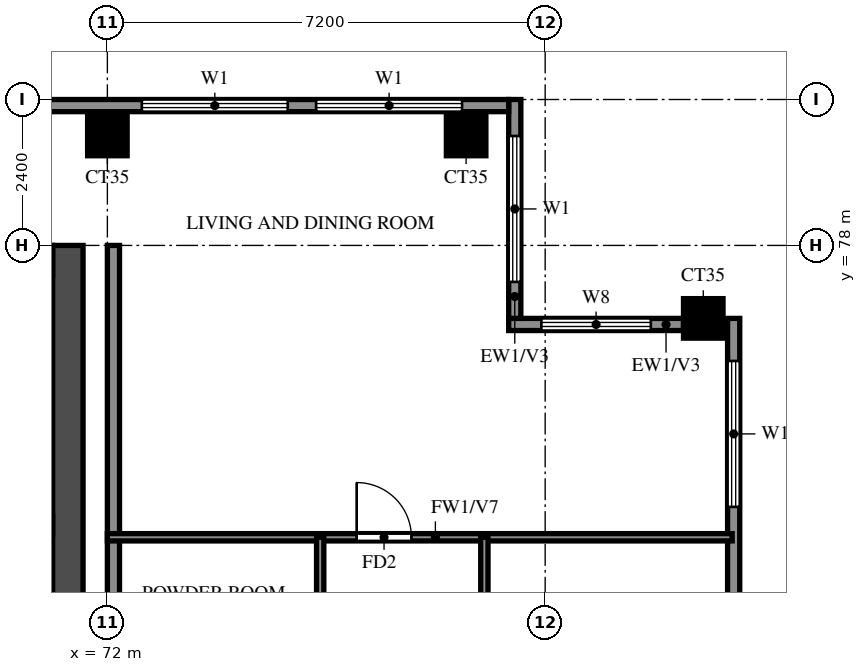
"""IFC4 building model, lengths in metres.
Left out: names, types, materials, properties, quantities, classifications, styles, units other than length and angle.
Written with IfcOpenShell. Run it as: python <this file> out.ifc"""

import sys

from ifc_helpers import new_model, si_unit, direction, frame, frame_2d, origin, origin_2d, place, context, subcontext, project, spatial, rectangle, extrude, source, transform, mapped, element, fill, save


model = new_model("IFC4")
c1 = context("Model", 3, precision=1e-05, world=origin(), true_north=direction((0.0, 1.0)))
c2 = subcontext(c1, "Body", "Model", "MODEL_VIEW")
j1 = project(units=[si_unit("LENGTHUNIT", "METRE"), si_unit("PLANEANGLEUNIT", "RADIAN")], contexts=[c1])
p1 = place(None, origin())
s1 = spatial("IfcSite", under=j1, at=p1, CompositionType="ELEMENT")
p2 = place(p1, origin())
s2 = spatial("IfcBuilding", under=s1, at=p2, CompositionType="ELEMENT")
p3 = place(p2, frame((0.0, 0.0, 243.0)))
s3 = spatial("IfcBuildingStorey", under=s2, at=p3, CompositionType="ELEMENT", Elevation=243.0)
m1 = source(origin(), c2, "Body", "SweptSolid", [
    extrude(rectangle(XDim=0.65, YDim=0.65, at=origin_2d()), origin(), (0.0, 0.0, 1.0), 3.22),
])
for number, where, z_axis, x_axis in (
    (1, (81.8, 76.8, 0.0), (0.0, 0.0, 1.0), (1.0, 0.0, 0.0)),
    (2, (72.0, 79.8, 0.0), (0.0, 0.0, 1.0), (1.0, 0.0, 0.0)),
    (3, (77.9, 79.8, 0.0), (0.0, 0.0, 1.0), (1.0, 0.0, 0.0)),
):
    element("IfcColumn", number, at=place(p3, frame(where, z_axis=z_axis, x_axis=x_axis)), inside=s3, PredefinedType="COLUMN", context=c2, shape_type="MappedRepresentation", body=[
        mapped(m1, transform((0.0, 0.0, 0.0))),
    ])
p4 = place(p3, frame((71.35, 66.15, 0.0), z_axis=(0.0, 0.0, 1.0), x_axis=(0.0, 1.0, 0.0)))
e4 = element("IfcWall", 4, at=p4, inside=s3, PredefinedType="SHEAR", context=c2, shape_type="SweptSolid", body=[
    extrude(rectangle(XDim=11.85, YDim=0.5, at=frame_2d((5.925, 0.0))), origin(), (0.0, 0.0, 1.0), 3.22),
])
p5 = place(p3, frame((29.7, 77.75, 0.0), z_axis=(0.0, 0.0, 1.0), x_axis=(1.0, 0.0, 0.0)))
e5 = element("IfcWall", 5, at=p5, inside=s3, PredefinedType="SHEAR", context=c2, shape_type="SweptSolid", body=[
    extrude(rectangle(XDim=41.4, YDim=0.5, at=frame_2d((20.7, 0.0))), origin(), (0.0, 0.0, 1.0), 3.22),
])
p6 = place(p3, frame((82.3, 48.2, 0.0), z_axis=(0.0, 0.0, 1.0), x_axis=(0.0, 1.0, 0.0)))
e6 = element("IfcWall", 6, at=p6, inside=s3, PredefinedType="SOLIDWALL", context=c2, shape_type="SweptSolid", body=[
    extrude(rectangle(XDim=28.6, YDim=0.2, at=frame_2d((14.3, 0.0))), origin(), (0.0, 0.0, 1.0), 3.22),
])
p7 = place(p6, frame((11.5, 0.0, 0.0)))
e7 = element("IfcOpeningElement", 7, at=p7, cuts=e6, PredefinedType="OPENING", context=c2, shape_type="SweptSolid", body=[
    extrude(rectangle(XDim=1.8, YDim=2.4, at=frame_2d((0.9, 1.2))), frame((0.0, 0.11, 0.0), z_axis=(0.0, -1.0, 0.0), x_axis=(1.0, 0.0, 0.0)), (0.0, 0.0, 1.0), 0.22),
])
p8 = place(p6, frame((0.9, 0.0, 0.6)))
e8 = element("IfcOpeningElement", 8, at=p8, cuts=e6, PredefinedType="OPENING", context=c2, shape_type="SweptSolid", body=[
    extrude(rectangle(XDim=2.4, YDim=2.4, at=frame_2d((1.2, 1.2))), frame((0.0, 0.11, 0.0), z_axis=(0.0, -1.0, 0.0), x_axis=(1.0, 0.0, 0.0)), (0.0, 0.0, 1.0), 0.22),
])
p9 = place(p6, frame((3.9, 0.0, 0.6)))
e9 = element("IfcOpeningElement", 9, at=p9, cuts=e6, PredefinedType="OPENING", context=c2, shape_type="SweptSolid", body=[
    extrude(rectangle(XDim=2.4, YDim=2.4, at=frame_2d((1.2, 1.2))), frame((0.0, 0.11, 0.0), z_axis=(0.0, -1.0, 0.0), x_axis=(1.0, 0.0, 0.0)), (0.0, 0.0, 1.0), 0.22),
])
p10 = place(p6, frame((7.3, 0.0, 0.6)))
e10 = element("IfcOpeningElement", 10, at=p10, cuts=e6, PredefinedType="OPENING", context=c2, shape_type="SweptSolid", body=[
    extrude(rectangle(XDim=1.8, YDim=2.4, at=frame_2d((0.9, 1.2))), frame((0.0, 0.11, 0.0), z_axis=(0.0, -1.0, 0.0), x_axis=(1.0, 0.0, 0.0)), (0.0, 0.0, 1.0), 0.22),
])
p11 = place(p6, frame((14.5, 0.0, 0.6)))
e11 = element("IfcOpeningElement", 11, at=p11, cuts=e6, PredefinedType="OPENING", context=c2, shape_type="SweptSolid", body=[
    extrude(rectangle(XDim=1.2, YDim=2.4, at=frame_2d((0.6, 1.2))), frame((0.0, 0.11, 0.0), z_axis=(0.0, -1.0, 0.0), x_axis=(1.0, 0.0, 0.0)), (0.0, 0.0, 1.0), 0.22),
])
p12 = place(p6, frame((17.8, 0.0, 0.6)))
e12 = element("IfcOpeningElement", 12, at=p12, cuts=e6, PredefinedType="OPENING", context=c2, shape_type="SweptSolid", body=[
    extrude(rectangle(XDim=2.4, YDim=2.4, at=frame_2d((1.2, 1.2))), frame((0.0, 0.11, 0.0), z_axis=(0.0, -1.0, 0.0), x_axis=(1.0, 0.0, 0.0)), (0.0, 0.0, 1.0), 0.22),
])
p13 = place(p6, frame((22.75, 0.0, 1.5)))
e13 = element("IfcOpeningElement", 13, at=p13, cuts=e6, PredefinedType="OPENING", context=c2, shape_type="SweptSolid", body=[
    extrude(rectangle(XDim=0.9, YDim=0.9, at=frame_2d((0.45, 0.45))), frame((0.0, 0.11, 0.0), z_axis=(0.0, -1.0, 0.0), x_axis=(1.0, 0.0, 0.0)), (0.0, 0.0, 1.0), 0.22),
])
p14 = place(p6, frame((25.5, 0.0, 0.6)))
e14 = element("IfcOpeningElement", 14, at=p14, cuts=e6, PredefinedType="OPENING", context=c2, shape_type="SweptSolid", body=[
    extrude(rectangle(XDim=2.4, YDim=2.4, at=frame_2d((1.2, 1.2))), frame((0.0, 0.11, 0.0), z_axis=(0.0, -1.0, 0.0), x_axis=(1.0, 0.0, 0.0)), (0.0, 0.0, 1.0), 0.22),
])
p15 = place(p3, frame((81.475, 76.7, 0.0), z_axis=(0.0, 0.0, 1.0), x_axis=(-1.0, 0.0, 0.0)))
e15 = element("IfcWall", 15, at=p15, inside=s3, PredefinedType="SOLIDWALL", context=c2, shape_type="SweptSolid", body=[
    extrude(rectangle(XDim=2.875, YDim=0.2, at=frame_2d((1.438, 0.0))), origin(), (0.0, 0.0, 1.0), 3.22),
])
p16 = place(p15, frame((0.538, 0.0, 0.6)))
e16 = element("IfcOpeningElement", 16, at=p16, cuts=e15, PredefinedType="OPENING", context=c2, shape_type="SweptSolid", body=[
    extrude(rectangle(XDim=1.8, YDim=2.4, at=frame_2d((0.9, 1.2))), frame((0.0, 0.11, 0.0), z_axis=(0.0, -1.0, 0.0), x_axis=(1.0, 0.0, 0.0)), (0.0, 0.0, 1.0), 0.22),
])
p17 = place(p3, frame((78.7, 76.8, 0.0), z_axis=(0.0, 0.0, 1.0), x_axis=(0.0, 1.0, 0.0)))
e17 = element("IfcWall", 17, at=p17, inside=s3, PredefinedType="SOLIDWALL", context=c2, shape_type="SweptSolid", body=[
    extrude(rectangle(XDim=3.6, YDim=0.2, at=frame_2d((1.8, 0.0))), origin(), (0.0, 0.0, 1.0), 3.22),
])
p18 = place(p17, frame((0.6, 0.0, 0.6)))
e18 = element("IfcOpeningElement", 18, at=p18, cuts=e17, PredefinedType="OPENING", context=c2, shape_type="SweptSolid", body=[
    extrude(rectangle(XDim=2.4, YDim=2.4, at=frame_2d((1.2, 1.2))), frame((0.0, 0.11, 0.0), z_axis=(0.0, -1.0, 0.0), x_axis=(1.0, 0.0, 0.0)), (0.0, 0.0, 1.0), 0.22),
])
p19 = place(p3, frame((78.6, 80.3, 0.0), z_axis=(0.0, 0.0, 1.0), x_axis=(-1.0, 0.0, 0.0)))
e19 = element("IfcWall", 19, at=p19, inside=s3, PredefinedType="SOLIDWALL", context=c2, shape_type="SweptSolid", body=[
    extrude(rectangle(XDim=56.6, YDim=0.2, at=frame_2d((28.3, 0.0))), origin(), (0.0, 0.0, 1.0), 3.22),
])
p20 = place(p19, frame((50.433, 0.0, 0.6)))
e20 = element("IfcOpeningElement", 20, at=p20, cuts=e19, PredefinedType="OPENING", context=c2, shape_type="SweptSolid", body=[
    extrude(rectangle(XDim=2.4, YDim=2.4, at=frame_2d((1.2, 1.2))), frame((0.0, 0.11, 0.0), z_axis=(0.0, -1.0, 0.0), x_axis=(1.0, 0.0, 0.0)), (0.0, 0.0, 1.0), 0.22),
])
p21 = place(p19, frame((53.367, 0.0, 0.6)))
e21 = element("IfcOpeningElement", 21, at=p21, cuts=e19, PredefinedType="OPENING", context=c2, shape_type="SweptSolid", body=[
    extrude(rectangle(XDim=2.4, YDim=2.4, at=frame_2d((1.2, 1.2))), frame((0.0, 0.11, 0.0), z_axis=(0.0, -1.0, 0.0), x_axis=(1.0, 0.0, 0.0)), (0.0, 0.0, 1.0), 0.22),
])
p22 = place(p19, frame((0.767, 0.0, 0.6)))
e22 = element("IfcOpeningElement", 22, at=p22, cuts=e19, PredefinedType="OPENING", context=c2, shape_type="SweptSolid", body=[
    extrude(rectangle(XDim=2.4, YDim=2.4, at=frame_2d((1.2, 1.2))), frame((0.0, 0.11, 0.0), z_axis=(0.0, -1.0, 0.0), x_axis=(1.0, 0.0, 0.0)), (0.0, 0.0, 1.0), 0.22),
])
p23 = place(p19, frame((3.633, 0.0, 0.6)))
e23 = element("IfcOpeningElement", 23, at=p23, cuts=e19, PredefinedType="OPENING", context=c2, shape_type="SweptSolid", body=[
    extrude(rectangle(XDim=2.4, YDim=2.4, at=frame_2d((1.2, 1.2))), frame((0.0, 0.11, 0.0), z_axis=(0.0, -1.0, 0.0), x_axis=(1.0, 0.0, 0.0)), (0.0, 0.0, 1.0), 0.22),
])
p24 = place(p3, frame((72.1, 62.4, 0.0), z_axis=(0.0, 0.0, 1.0), x_axis=(0.0, 1.0, 0.0)))
e24 = element("IfcWall", 24, at=p24, inside=s3, PredefinedType="SOLIDWALL", context=c2, shape_type="SweptSolid", body=[
    extrude(rectangle(XDim=15.6, YDim=0.2, at=frame_2d((7.8, 0.0))), origin(), (0.0, 0.0, 1.0), 3.22),
])
p25 = place(p3, frame((72.0, 73.2, 0.0), z_axis=(0.0, 0.0, 1.0), x_axis=(1.0, 0.0, 0.0)))
e25 = element("IfcWall", 25, at=p25, inside=s3, PredefinedType="PARTITIONING", context=c2, shape_type="SweptSolid", body=[
    extrude(rectangle(XDim=10.275, YDim=0.12, at=frame_2d((5.137, 0.0))), origin(), (0.0, 0.0, 1.0), 2.32),
])
p26 = place(p25, frame((4.1, 0.0, 0.0)))
e26 = element("IfcOpeningElement", 26, at=p26, cuts=e25, PredefinedType="OPENING", context=c2, shape_type="SweptSolid", body=[
    extrude(rectangle(XDim=0.9, YDim=2.1, at=frame_2d((0.45, 1.05))), frame((0.0, 0.07, 0.0), z_axis=(0.0, -1.0, 0.0), x_axis=(1.0, 0.0, 0.0)), (0.0, 0.0, 1.0), 0.14),
])
p27 = place(p3, frame((75.5, 61.2, 0.0), z_axis=(0.0, 0.0, 1.0), x_axis=(0.0, 1.0, 0.0)))
e27 = element("IfcWall", 27, at=p27, inside=s3, PredefinedType="PARTITIONING", context=c2, shape_type="SweptSolid", body=[
    extrude(rectangle(XDim=12.0, YDim=0.12, at=frame_2d((6.0, 0.0))), origin(), (0.0, 0.0, 1.0), 3.22),
])
p28 = place(p27, frame((5.3, 0.0, 0.0)))
e28 = element("IfcOpeningElement", 28, at=p28, cuts=e27, PredefinedType="OPENING", context=c2, shape_type="SweptSolid", body=[
    extrude(rectangle(XDim=0.9, YDim=2.1, at=frame_2d((0.45, 1.05))), frame((0.0, 0.07, 0.0), z_axis=(0.0, -1.0, 0.0), x_axis=(1.0, 0.0, 0.0)), (0.0, 0.0, 1.0), 0.14),
])
p29 = place(p27, frame((9.7, 0.0, 0.0)))
e29 = element("IfcOpeningElement", 29, at=p29, cuts=e27, PredefinedType="OPENING", context=c2, shape_type="SweptSolid", body=[
    extrude(rectangle(XDim=0.8, YDim=2.1, at=frame_2d((0.4, 1.05))), frame((0.0, 0.07, 0.0), z_axis=(0.0, -1.0, 0.0), x_axis=(1.0, 0.0, 0.0)), (0.0, 0.0, 1.0), 0.14),
])
p30 = place(p3, frame((78.2, 69.6, 0.0), z_axis=(0.0, 0.0, 1.0), x_axis=(0.0, 1.0, 0.0)))
e30 = element("IfcWall", 30, at=p30, inside=s3, PredefinedType="PARTITIONING", context=c2, shape_type="SweptSolid", body=[
    extrude(rectangle(XDim=3.6, YDim=0.12, at=frame_2d((1.8, 0.0))), origin(), (0.0, 0.0, 1.0), 3.22),
])
p31 = place(p14, origin())
e31 = element("IfcWindow", 31, at=p31, inside=s3, PartitioningType="DOUBLE_PANEL_VERTICAL", PredefinedType="WINDOW", context=c2, shape_type="SweptSolid", body=[
    extrude(rectangle(XDim=2.4, YDim=2.4, at=frame_2d((1.2, 1.2))), frame((0.0, 0.03, 0.0), z_axis=(0.0, -1.0, 0.0), x_axis=(1.0, 0.0, 0.0)), (0.0, 0.0, 1.0), 0.06),
])
fill(e14, e31)
p32 = place(p16, origin())
e32 = element("IfcWindow", 32, at=p32, inside=s3, PartitioningType="DOUBLE_PANEL_VERTICAL", PredefinedType="WINDOW", context=c2, shape_type="SweptSolid", body=[
    extrude(rectangle(XDim=1.8, YDim=2.4, at=frame_2d((0.9, 1.2))), frame((0.0, 0.03, 0.0), z_axis=(0.0, -1.0, 0.0), x_axis=(1.0, 0.0, 0.0)), (0.0, 0.0, 1.0), 0.06),
])
fill(e16, e32)
p33 = place(p18, origin())
e33 = element("IfcWindow", 33, at=p33, inside=s3, PartitioningType="DOUBLE_PANEL_VERTICAL", PredefinedType="WINDOW", context=c2, shape_type="SweptSolid", body=[
    extrude(rectangle(XDim=2.4, YDim=2.4, at=frame_2d((1.2, 1.2))), frame((0.0, 0.03, 0.0), z_axis=(0.0, -1.0, 0.0), x_axis=(1.0, 0.0, 0.0)), (0.0, 0.0, 1.0), 0.06),
])
fill(e18, e33)
p34 = place(p22, origin())
e34 = element("IfcWindow", 34, at=p34, inside=s3, PartitioningType="DOUBLE_PANEL_VERTICAL", PredefinedType="WINDOW", context=c2, shape_type="SweptSolid", body=[
    extrude(rectangle(XDim=2.4, YDim=2.4, at=frame_2d((1.2, 1.2))), frame((0.0, 0.03, 0.0), z_axis=(0.0, -1.0, 0.0), x_axis=(1.0, 0.0, 0.0)), (0.0, 0.0, 1.0), 0.06),
])
fill(e22, e34)
p35 = place(p23, origin())
e35 = element("IfcWindow", 35, at=p35, inside=s3, PartitioningType="DOUBLE_PANEL_VERTICAL", PredefinedType="WINDOW", context=c2, shape_type="SweptSolid", body=[
    extrude(rectangle(XDim=2.4, YDim=2.4, at=frame_2d((1.2, 1.2))), frame((0.0, 0.03, 0.0), z_axis=(0.0, -1.0, 0.0), x_axis=(1.0, 0.0, 0.0)), (0.0, 0.0, 1.0), 0.06),
])
fill(e23, e35)
p36 = place(p26, origin())
e36 = element("IfcDoor", 36, at=p36, inside=s3, OperationType="SINGLE_SWING_LEFT", PredefinedType="DOOR", context=c2, shape_type="SweptSolid", body=[
    extrude(rectangle(XDim=0.9, YDim=2.1, at=frame_2d((0.45, 1.05))), frame((0.0, 0.025, 0.0), z_axis=(0.0, -1.0, 0.0), x_axis=(1.0, 0.0, 0.0)), (0.0, 0.0, 1.0), 0.05),
])
fill(e26, e36)
save(model, sys.argv[1])
